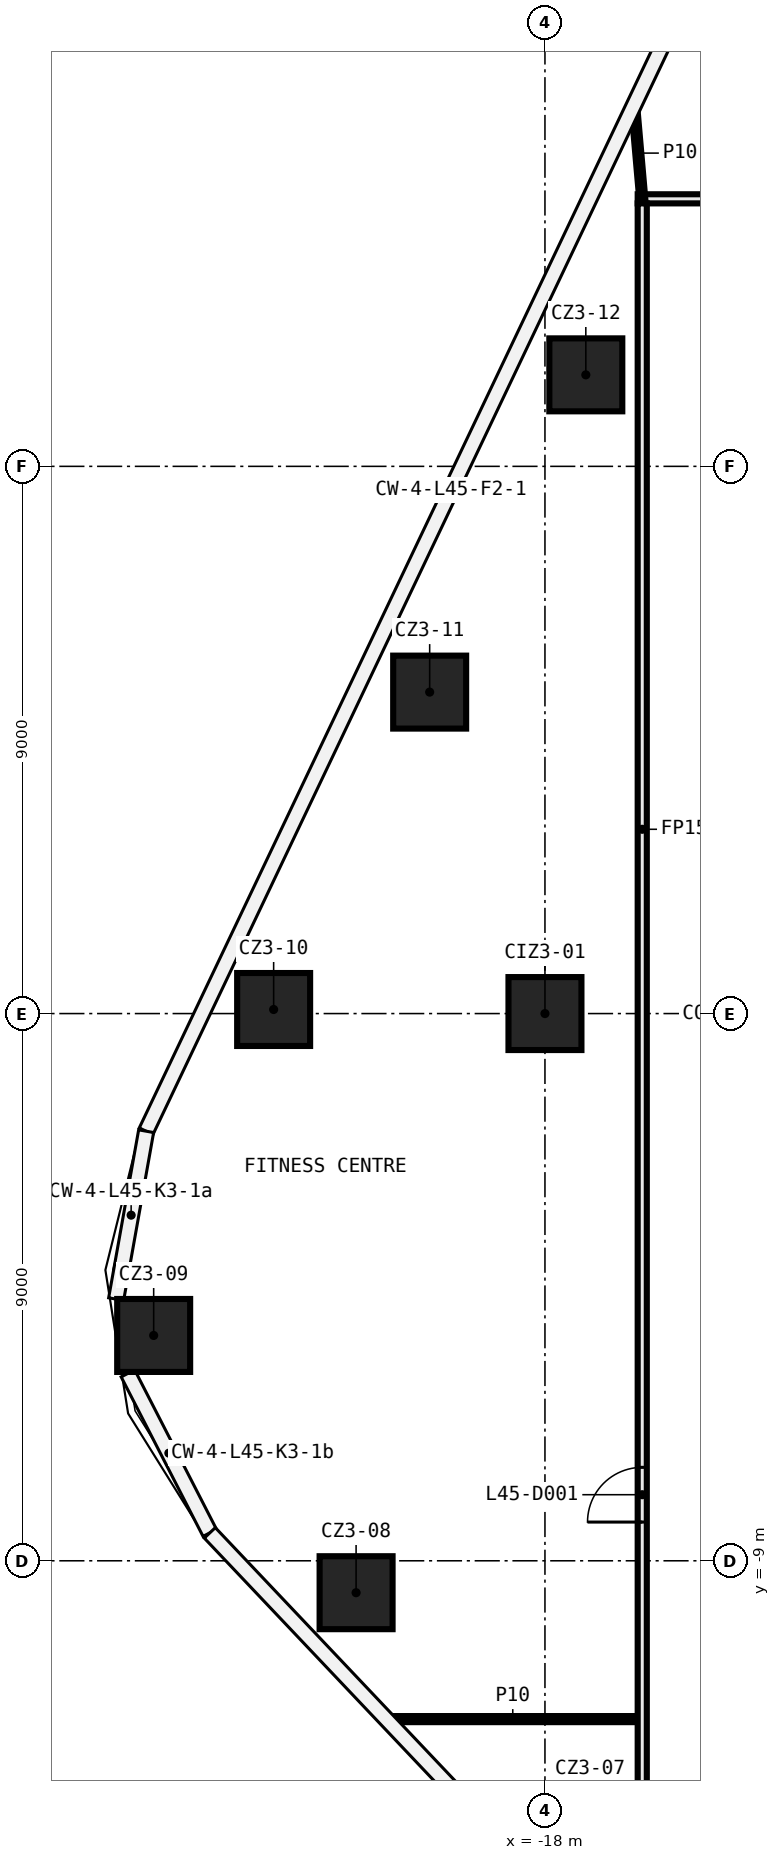
"""IFC4 building model, lengths in metres.
Left out: names, types, materials, properties, quantities, classifications, styles, units other than length and angle.
Written with IfcOpenShell. Run it as: python <this file> out.ifc"""

import sys

from ifc_helpers import new_model, si_unit, direction, frame, frame_2d, origin, origin_2d, place, context, subcontext, project, spatial, rectangle, extrude, element, fill, save


model = new_model("IFC4")
c1 = context("Model", 3, precision=1e-05, world=origin(), true_north=direction((0.0, 1.0)))
c2 = subcontext(c1, "Body", "Model", "MODEL_VIEW")
j1 = project(units=[si_unit("LENGTHUNIT", "METRE"), si_unit("PLANEANGLEUNIT", "RADIAN")], contexts=[c1])
p1 = place(None, origin())
s1 = spatial("IfcSite", under=j1, at=p1, CompositionType="ELEMENT")
p2 = place(p1, origin())
s2 = spatial("IfcBuilding", under=s1, at=p2, CompositionType="ELEMENT")
p3 = place(p2, frame((0.0, 0.0, 215.6)))
s3 = spatial("IfcBuildingStorey", under=s2, at=p3, CompositionType="ELEMENT", Elevation=215.6)
for number, where, z_axis, x_axis in (
    (1, (-21.106, -9.525, 0.0), (0.0, 0.0, 1.0), (1.0, 0.0, 0.0)),
    (2, (-24.435, -5.294, 0.0), (0.0, 0.0, 1.0), (1.0, 0.0, 0.0)),
    (3, (-22.462, 0.067, 0.0), (0.0, 0.0, 1.0), (1.0, 0.0, 0.0)),
    (4, (-19.896, 5.287, 0.0), (0.0, 0.0, 1.0), (1.0, 0.0, 0.0)),
    (5, (-17.328, 10.505, 0.0), (0.0, 0.0, 1.0), (1.0, 0.0, 0.0)),
    (6, (-18.0, 0.0, 0.0), (0.0, 0.0, 1.0), (1.0, 0.0, 0.0)),
):
    element("IfcColumn", number, at=place(p3, frame(where, z_axis=z_axis, x_axis=x_axis)), inside=s3, PredefinedType="COLUMN", context=c2, shape_type="SweptSolid", body=[
        extrude(rectangle(XDim=1.2, YDim=1.2, at=origin_2d()), origin(), (0.0, 0.0, 1.0), 4.4),
    ])
p4 = place(p3, frame((-20.584, -11.604, 0.0), z_axis=(0.0, 0.0, 1.0), x_axis=(1.0, 0.0, 0.0)))
e7 = element("IfcWall", 7, at=p4, inside=s3, PredefinedType="PARTITIONING", context=c2, shape_type="SweptSolid", body=[
    extrude(rectangle(XDim=4.109, YDim=0.1, at=frame_2d((2.054, 0.0))), origin(), (0.0, 0.0, 1.0), 4.4),
])
p5 = place(p3, frame((-16.475, 13.4, 0.0), z_axis=(0.0, 0.0, 1.0), x_axis=(1.0, 0.0, 0.0)))
e8 = element("IfcWall", 8, at=p5, inside=s3, PredefinedType="PARTITIONING", context=c2, shape_type="SweptSolid", body=[
    extrude(rectangle(XDim=32.95, YDim=0.15, at=frame_2d((16.475, 0.0))), origin(), (0.0, 0.0, 1.0), 4.4),
])
p6 = place(p5, frame((28.839, 0.0, 0.0)))
e9 = element("IfcOpeningElement", 9, at=p6, cuts=e8, PredefinedType="OPENING", context=c2, shape_type="SweptSolid", body=[
    extrude(rectangle(XDim=0.9, YDim=2.1, at=frame_2d((0.45, 1.05))), frame((0.0, 0.085, 0.0), z_axis=(0.0, -1.0, 0.0), x_axis=(1.0, 0.0, 0.0)), (0.0, 0.0, 1.0), 0.17),
])
p7 = place(p5, frame((23.062, 0.0, 0.0)))
e10 = element("IfcOpeningElement", 10, at=p7, cuts=e8, PredefinedType="OPENING", context=c2, shape_type="SweptSolid", body=[
    extrude(rectangle(XDim=0.9, YDim=2.1, at=frame_2d((0.45, 1.05))), frame((0.0, 0.085, 0.0), z_axis=(0.0, -1.0, 0.0), x_axis=(1.0, 0.0, 0.0)), (0.0, 0.0, 1.0), 0.17),
])
p8 = place(p5, frame((13.047, 0.0, 0.0)))
e11 = element("IfcOpeningElement", 11, at=p8, cuts=e8, PredefinedType="OPENING", context=c2, shape_type="SweptSolid", body=[
    extrude(rectangle(XDim=0.9, YDim=2.1, at=frame_2d((0.45, 1.05))), frame((0.0, 0.085, 0.0), z_axis=(0.0, -1.0, 0.0), x_axis=(1.0, 0.0, 0.0)), (0.0, 0.0, 1.0), 0.17),
])
p9 = place(p5, frame((6.854, 0.0, 0.0)))
e12 = element("IfcOpeningElement", 12, at=p9, cuts=e8, PredefinedType="OPENING", context=c2, shape_type="SweptSolid", body=[
    extrude(rectangle(XDim=0.9, YDim=2.1, at=frame_2d((0.45, 1.05))), frame((0.0, 0.085, 0.0), z_axis=(0.0, -1.0, 0.0), x_axis=(1.0, 0.0, 0.0)), (0.0, 0.0, 1.0), 0.17),
])
p10 = place(p3, frame((-16.4, -13.325, 0.0), z_axis=(0.0, 0.0, 1.0), x_axis=(0.0, 1.0, 0.0)))
e13 = element("IfcWall", 13, at=p10, inside=s3, PredefinedType="PARTITIONING", context=c2, shape_type="SweptSolid", body=[
    extrude(rectangle(XDim=26.65, YDim=0.15, at=frame_2d((13.325, 0.0))), origin(), (0.0, 0.0, 1.0), 4.4),
])
p11 = place(p10, frame((4.962, 0.0, 0.0)))
e14 = element("IfcOpeningElement", 14, at=p11, cuts=e13, PredefinedType="OPENING", context=c2, shape_type="SweptSolid", body=[
    extrude(rectangle(XDim=0.9, YDim=2.1, at=frame_2d((0.45, 1.05))), frame((0.0, 0.085, 0.0), z_axis=(0.0, -1.0, 0.0), x_axis=(1.0, 0.0, 0.0)), (0.0, 0.0, 1.0), 0.17),
])
p12 = place(p3, frame((-16.531, 14.904, 0.0), z_axis=(0.0, 0.0, 1.0), x_axis=(0.086992440638, -0.996208971688, 0.0)))
e15 = element("IfcWall", 15, at=p12, inside=s3, PredefinedType="PARTITIONING", context=c2, shape_type="SweptSolid", body=[
    extrude(rectangle(XDim=1.51, YDim=0.1, at=frame_2d((0.755, 0.0))), origin(), (0.0, 0.0, 1.0), 4.4),
])
p13 = place(p11, origin())
e16 = element("IfcDoor", 16, at=p13, inside=s3, OperationType="SINGLE_SWING_RIGHT", PredefinedType="DOOR", context=c2, shape_type="SweptSolid", body=[
    extrude(rectangle(XDim=0.9, YDim=2.1, at=frame_2d((0.45, 1.05))), frame((0.0, 0.025, 0.0), z_axis=(0.0, -1.0, 0.0), x_axis=(1.0, 0.0, 0.0)), (0.0, 0.0, 1.0), 0.05),
])
fill(e14, e16)
save(model, sys.argv[1])
